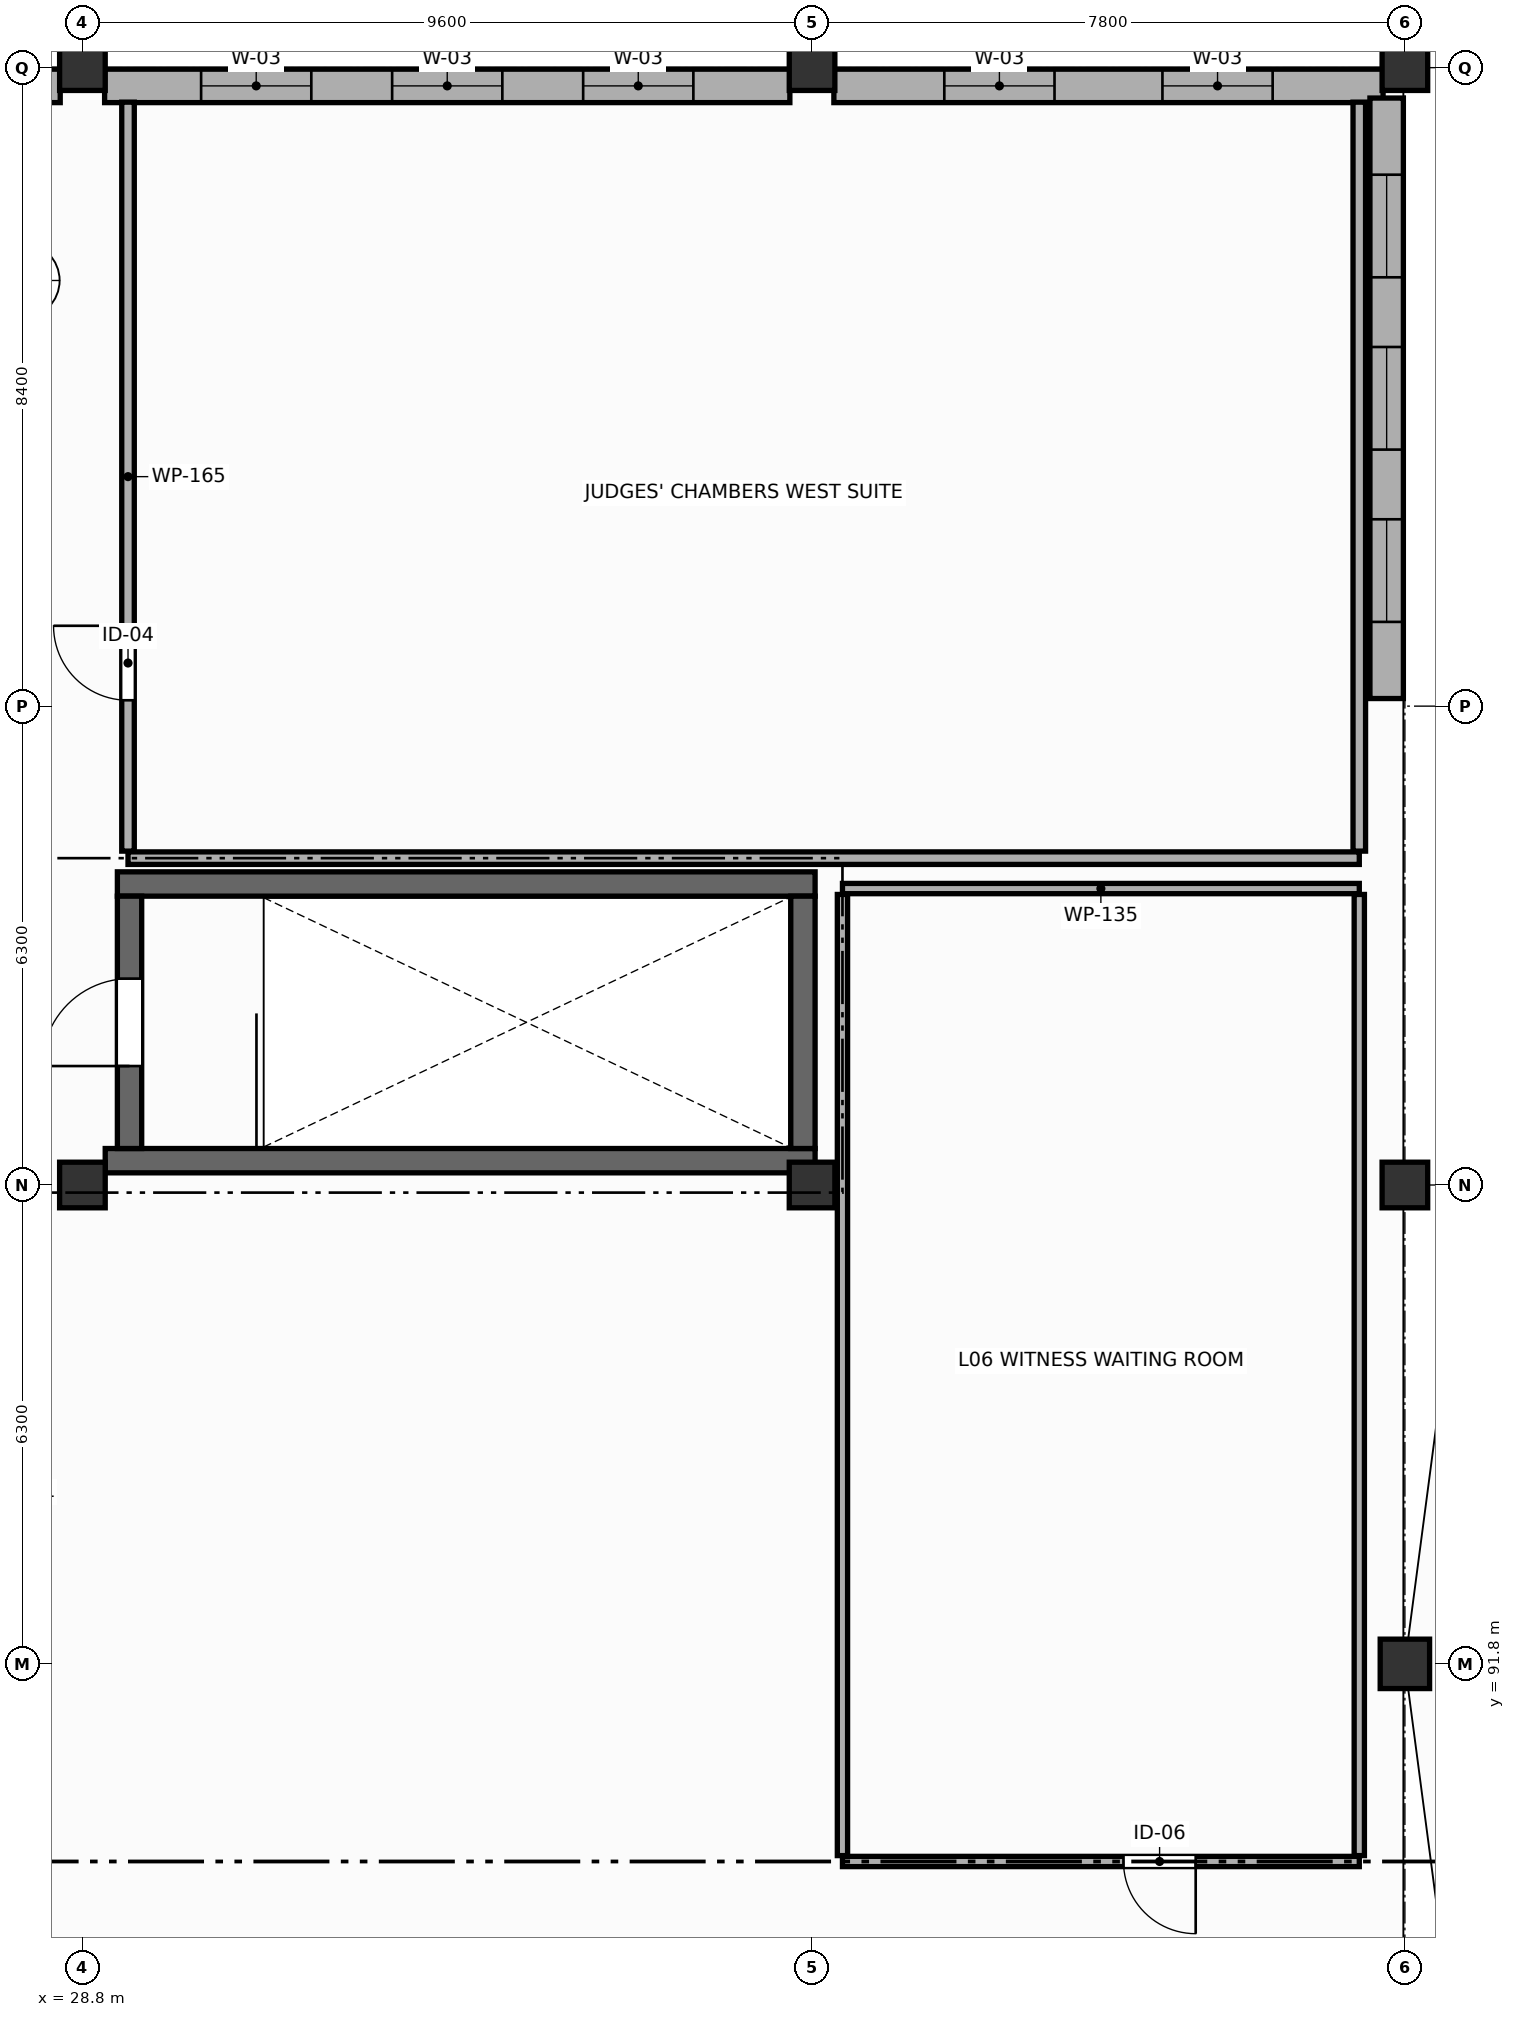
"""IFC4 building model, lengths in metres.
Left out: names, types, materials, properties, quantities, classifications, styles, units other than length and angle.
Written with IfcOpenShell. Run it as: python <this file> out.ifc"""

import sys

from ifc_helpers import new_model, si_unit, direction, frame, frame_2d, origin, origin_2d, place, context, subcontext, project, spatial, rectangle, circle, extrude, element, fill, save


model = new_model("IFC4")
c1 = context("Model", 3, precision=1e-05, world=origin(), true_north=direction((0.0, 1.0)))
c2 = subcontext(c1, "Body", "Model", "MODEL_VIEW")
j1 = project(units=[si_unit("LENGTHUNIT", "METRE"), si_unit("PLANEANGLEUNIT", "RADIAN")], contexts=[c1])
p1 = place(None, origin())
s1 = spatial("IfcSite", under=j1, at=p1, CompositionType="ELEMENT")
p2 = place(p1, origin())
s2 = spatial("IfcBuilding", under=s1, at=p2, CompositionType="ELEMENT")
p3 = place(p2, frame((0.0, 0.0, 22.8)))
s3 = spatial("IfcBuildingStorey", under=s2, at=p3, CompositionType="ELEMENT", Elevation=22.8)
p4 = place(p3, frame((46.2, 91.8, 0.0), z_axis=(0.0, 0.0, 1.0), x_axis=(1.0, 0.0, 0.0)))
e1 = element("IfcColumn", 1, at=p4, inside=s3, PredefinedType="COLUMN", context=c2, shape_type="SweptSolid", body=[
    extrude(circle(Radius=0.325, at=origin_2d()), origin(), (0.0, 0.0, 1.0), 4.2),
])
for number, where, z_axis, x_axis in (
    (2, (28.8, 98.1, 0.0), (0.0, 0.0, 1.0), (1.0, 0.0, 0.0)),
    (3, (28.8, 112.8, 0.0), (0.0, 0.0, 1.0), (1.0, 0.0, 0.0)),
    (4, (38.4, 98.1, 0.0), (0.0, 0.0, 1.0), (1.0, 0.0, 0.0)),
    (5, (38.4, 112.8, 0.0), (0.0, 0.0, 1.0), (1.0, 0.0, 0.0)),
    (6, (46.2, 98.1, 0.0), (0.0, 0.0, 1.0), (1.0, 0.0, 0.0)),
    (7, (46.2, 112.8, 0.0), (0.0, 0.0, 1.0), (1.0, 0.0, 0.0)),
):
    element("IfcColumn", number, at=place(p3, frame(where, z_axis=z_axis, x_axis=x_axis)), inside=s3, PredefinedType="COLUMN", context=c2, shape_type="SweptSolid", body=[
        extrude(rectangle(XDim=0.6, YDim=0.6, at=origin_2d()), origin(), (0.0, 0.0, 1.0), 4.2),
    ])
p5 = place(p3, frame((19.492, 112.56, 0.0), z_axis=(0.0, 0.0, 1.0), x_axis=(1.0, 0.0, 0.0)))
e8 = element("IfcWall", 8, at=p5, inside=s3, PredefinedType="STANDARD", context=c2, shape_type="SweptSolid", body=[
    extrude(rectangle(XDim=9.016, YDim=0.44, at=frame_2d((4.508, 0.0))), origin(), (0.0, 0.0, 1.0), 3.05),
])
p6 = place(p5, frame((1.27, 0.0, 0.78)))
e9 = element("IfcOpeningElement", 9, at=p6, cuts=e8, PredefinedType="OPENING", context=c2, shape_type="SweptSolid", body=[
    extrude(rectangle(XDim=1.45, YDim=2.05, at=frame_2d((0.725, 1.025))), frame((0.0, 0.23, 0.0), z_axis=(0.0, -1.0, 0.0), x_axis=(1.0, 0.0, 0.0)), (0.0, 0.0, 1.0), 0.46),
])
p7 = place(p5, frame((3.783, 0.0, 0.78)))
e10 = element("IfcOpeningElement", 10, at=p7, cuts=e8, PredefinedType="OPENING", context=c2, shape_type="SweptSolid", body=[
    extrude(rectangle(XDim=1.45, YDim=2.05, at=frame_2d((0.725, 1.025))), frame((0.0, 0.23, 0.0), z_axis=(0.0, -1.0, 0.0), x_axis=(1.0, 0.0, 0.0)), (0.0, 0.0, 1.0), 0.46),
])
p8 = place(p5, frame((6.296, 0.0, 0.78)))
e11 = element("IfcOpeningElement", 11, at=p8, cuts=e8, PredefinedType="OPENING", context=c2, shape_type="SweptSolid", body=[
    extrude(rectangle(XDim=1.45, YDim=2.05, at=frame_2d((0.725, 1.025))), frame((0.0, 0.23, 0.0), z_axis=(0.0, -1.0, 0.0), x_axis=(1.0, 0.0, 0.0)), (0.0, 0.0, 1.0), 0.46),
])
p9 = place(p3, frame((29.092, 112.56, 0.0), z_axis=(0.0, 0.0, 1.0), x_axis=(1.0, 0.0, 0.0)))
e12 = element("IfcWall", 12, at=p9, inside=s3, PredefinedType="STANDARD", context=c2, shape_type="SweptSolid", body=[
    extrude(rectangle(XDim=9.016, YDim=0.44, at=frame_2d((4.508, 0.0))), origin(), (0.0, 0.0, 1.0), 3.05),
])
p10 = place(p9, frame((1.27, 0.0, 0.78)))
e13 = element("IfcOpeningElement", 13, at=p10, cuts=e12, PredefinedType="OPENING", context=c2, shape_type="SweptSolid", body=[
    extrude(rectangle(XDim=1.45, YDim=2.05, at=frame_2d((0.725, 1.025))), frame((0.0, 0.23, 0.0), z_axis=(0.0, -1.0, 0.0), x_axis=(1.0, 0.0, 0.0)), (0.0, 0.0, 1.0), 0.46),
])
p11 = place(p9, frame((3.783, 0.0, 0.78)))
e14 = element("IfcOpeningElement", 14, at=p11, cuts=e12, PredefinedType="OPENING", context=c2, shape_type="SweptSolid", body=[
    extrude(rectangle(XDim=1.45, YDim=2.05, at=frame_2d((0.725, 1.025))), frame((0.0, 0.23, 0.0), z_axis=(0.0, -1.0, 0.0), x_axis=(1.0, 0.0, 0.0)), (0.0, 0.0, 1.0), 0.46),
])
p12 = place(p9, frame((6.296, 0.0, 0.78)))
e15 = element("IfcOpeningElement", 15, at=p12, cuts=e12, PredefinedType="OPENING", context=c2, shape_type="SweptSolid", body=[
    extrude(rectangle(XDim=1.45, YDim=2.05, at=frame_2d((0.725, 1.025))), frame((0.0, 0.23, 0.0), z_axis=(0.0, -1.0, 0.0), x_axis=(1.0, 0.0, 0.0)), (0.0, 0.0, 1.0), 0.46),
])
p13 = place(p3, frame((38.687, 112.56, 0.0), z_axis=(0.0, 0.0, 1.0), x_axis=(1.0, 0.0, 0.0)))
e16 = element("IfcWall", 16, at=p13, inside=s3, PredefinedType="STANDARD", context=c2, shape_type="SweptSolid", body=[
    extrude(rectangle(XDim=7.226, YDim=0.44, at=frame_2d((3.613, 0.0))), origin(), (0.0, 0.0, 1.0), 3.05),
])
p14 = place(p13, frame((1.453, 0.0, 0.78)))
e17 = element("IfcOpeningElement", 17, at=p14, cuts=e16, PredefinedType="OPENING", context=c2, shape_type="SweptSolid", body=[
    extrude(rectangle(XDim=1.45, YDim=2.05, at=frame_2d((0.725, 1.025))), frame((0.0, 0.23, 0.0), z_axis=(0.0, -1.0, 0.0), x_axis=(1.0, 0.0, 0.0)), (0.0, 0.0, 1.0), 0.46),
])
p15 = place(p13, frame((4.323, 0.0, 0.78)))
e18 = element("IfcOpeningElement", 18, at=p15, cuts=e16, PredefinedType="OPENING", context=c2, shape_type="SweptSolid", body=[
    extrude(rectangle(XDim=1.45, YDim=2.05, at=frame_2d((0.725, 1.025))), frame((0.0, 0.23, 0.0), z_axis=(0.0, -1.0, 0.0), x_axis=(1.0, 0.0, 0.0)), (0.0, 0.0, 1.0), 0.46),
])
p16 = place(p3, frame((45.96, 104.5, 0.0), z_axis=(0.0, 0.0, 1.0), x_axis=(0.0, 1.0, 0.0)))
e19 = element("IfcWall", 19, at=p16, inside=s3, PredefinedType="STANDARD", context=c2, shape_type="SweptSolid", body=[
    extrude(rectangle(XDim=7.9, YDim=0.44, at=frame_2d((3.95, 0.0))), origin(), (0.0, 0.0, 1.0), 3.05),
])
p17 = place(p16, frame((1.008, 0.0, 0.85)))
e20 = element("IfcOpeningElement", 20, at=p17, cuts=e19, PredefinedType="OPENING", context=c2, shape_type="SweptSolid", body=[
    extrude(rectangle(XDim=1.35, YDim=1.95, at=frame_2d((0.675, 0.975))), frame((0.0, 0.23, 0.0), z_axis=(0.0, -1.0, 0.0), x_axis=(1.0, 0.0, 0.0)), (0.0, 0.0, 1.0), 0.46),
])
p18 = place(p16, frame((3.275, 0.0, 0.85)))
e21 = element("IfcOpeningElement", 21, at=p18, cuts=e19, PredefinedType="OPENING", context=c2, shape_type="SweptSolid", body=[
    extrude(rectangle(XDim=1.35, YDim=1.95, at=frame_2d((0.675, 0.975))), frame((0.0, 0.23, 0.0), z_axis=(0.0, -1.0, 0.0), x_axis=(1.0, 0.0, 0.0)), (0.0, 0.0, 1.0), 0.46),
])
p19 = place(p16, frame((5.542, 0.0, 0.85)))
e22 = element("IfcOpeningElement", 22, at=p19, cuts=e19, PredefinedType="OPENING", context=c2, shape_type="SweptSolid", body=[
    extrude(rectangle(XDim=1.35, YDim=1.95, at=frame_2d((0.675, 0.975))), frame((0.0, 0.23, 0.0), z_axis=(0.0, -1.0, 0.0), x_axis=(1.0, 0.0, 0.0)), (0.0, 0.0, 1.0), 0.46),
])
p20 = place(p3, frame((29.26, 102.06, 0.0), z_axis=(0.0, 0.0, 1.0), x_axis=(1.0, 0.0, 0.0)))
e23 = element("IfcWall", 23, at=p20, inside=s3, PredefinedType="SHEAR", context=c2, shape_type="SweptSolid", body=[
    extrude(rectangle(XDim=9.18, YDim=0.32, at=frame_2d((4.59, 0.0))), origin(), (0.0, 0.0, 1.0), 3.97),
])
p21 = place(p3, frame((38.44, 98.42, 0.0), z_axis=(0.0, 0.0, 1.0), x_axis=(-1.0, 0.0, 0.0)))
e24 = element("IfcWall", 24, at=p21, inside=s3, PredefinedType="SHEAR", context=c2, shape_type="SweptSolid", body=[
    extrude(rectangle(XDim=9.34, YDim=0.32, at=frame_2d((4.67, 0.0))), origin(), (0.0, 0.0, 1.0), 3.97),
])
p22 = place(p3, frame((29.42, 98.58, 0.0), z_axis=(0.0, 0.0, 1.0), x_axis=(0.0, 1.0, 0.0)))
e25 = element("IfcWall", 25, at=p22, inside=s3, PredefinedType="SHEAR", context=c2, shape_type="SweptSolid", body=[
    extrude(rectangle(XDim=3.32, YDim=0.32, at=frame_2d((1.66, 0.0))), origin(), (0.0, 0.0, 1.0), 3.97),
])
p23 = place(p22, frame((1.085, 0.0, 0.0)))
e26 = element("IfcOpeningElement", 26, at=p23, cuts=e25, PredefinedType="OPENING", context=c2, shape_type="SweptSolid", body=[
    extrude(rectangle(XDim=1.15, YDim=2.2, at=frame_2d((0.575, 1.1))), frame((0.0, 0.17, 0.0), z_axis=(0.0, -1.0, 0.0), x_axis=(1.0, 0.0, 0.0)), (0.0, 0.0, 1.0), 0.34),
])
p24 = place(p3, frame((38.28, 101.9, 0.0), z_axis=(0.0, 0.0, 1.0), x_axis=(0.0, -1.0, 0.0)))
e27 = element("IfcWall", 27, at=p24, inside=s3, PredefinedType="SHEAR", context=c2, shape_type="SweptSolid", body=[
    extrude(rectangle(XDim=3.32, YDim=0.32, at=frame_2d((1.66, 0.0))), origin(), (0.0, 0.0, 1.0), 3.97),
])
p25 = place(p3, frame((45.6, 102.4, 0.0), z_axis=(0.0, 0.0, 1.0), x_axis=(-1.0, 0.0, 0.0)))
e28 = element("IfcWall", 28, at=p25, inside=s3, PredefinedType="PARTITIONING", context=c2, shape_type="SweptSolid", body=[
    extrude(rectangle(XDim=16.2, YDim=0.165, at=frame_2d((8.1, 0.0))), origin(), (0.0, 0.0, 1.0), 3.05),
])
p26 = place(p3, frame((29.4, 102.492, 0.0), z_axis=(0.0, 0.0, 1.0), x_axis=(0.0, 1.0, 0.0)))
e29 = element("IfcWall", 29, at=p26, inside=s3, PredefinedType="PARTITIONING", context=c2, shape_type="SweptSolid", body=[
    extrude(rectangle(XDim=9.854, YDim=0.165, at=frame_2d((4.927, 0.0))), origin(), (0.0, 0.0, 1.0), 3.35),
])
p27 = place(p26, frame((1.985, 0.0, 0.0)))
e30 = element("IfcOpeningElement", 30, at=p27, cuts=e29, PredefinedType="OPENING", context=c2, shape_type="SweptSolid", body=[
    extrude(rectangle(XDim=0.98, YDim=2.2, at=frame_2d((0.49, 1.1))), frame((0.0, 0.093, 0.0), z_axis=(0.0, -1.0, 0.0), x_axis=(1.0, 0.0, 0.0)), (0.0, 0.0, 1.0), 0.185),
])
p28 = place(p3, frame((45.6, 112.346, 0.0), z_axis=(0.0, 0.0, 1.0), x_axis=(0.0, -1.0, 0.0)))
e31 = element("IfcWall", 31, at=p28, inside=s3, PredefinedType="PARTITIONING", context=c2, shape_type="SweptSolid", body=[
    extrude(rectangle(XDim=9.854, YDim=0.165, at=frame_2d((4.927, 0.0))), origin(), (0.0, 0.0, 1.0), 3.35),
])
p29 = place(p3, frame((38.8, 102.0, 0.0), z_axis=(0.0, 0.0, 1.0), x_axis=(1.0, 0.0, 0.0)))
e32 = element("IfcWall", 32, at=p29, inside=s3, PredefinedType="PARTITIONING", context=c2, shape_type="SweptSolid", body=[
    extrude(rectangle(XDim=6.8, YDim=0.135, at=frame_2d((3.4, 0.0))), origin(), (0.0, 0.0, 1.0), 3.05),
])
p30 = place(p3, frame((45.6, 89.2, 0.0), z_axis=(0.0, 0.0, 1.0), x_axis=(-1.0, 0.0, 0.0)))
e33 = element("IfcWall", 33, at=p30, inside=s3, PredefinedType="PARTITIONING", context=c2, shape_type="SweptSolid", body=[
    extrude(rectangle(XDim=6.8, YDim=0.135, at=frame_2d((3.4, 0.0))), origin(), (0.0, 0.0, 1.0), 3.075),
])
p31 = place(p30, frame((2.153, 0.0, 0.0)))
e34 = element("IfcOpeningElement", 34, at=p31, cuts=e33, PredefinedType="OPENING", context=c2, shape_type="SweptSolid", body=[
    extrude(rectangle(XDim=0.95, YDim=2.15, at=frame_2d((0.475, 1.075))), frame((0.0, 0.077, 0.0), z_axis=(0.0, -1.0, 0.0), x_axis=(1.0, 0.0, 0.0)), (0.0, 0.0, 1.0), 0.155),
])
p32 = place(p3, frame((38.8, 89.278, 0.0), z_axis=(0.0, 0.0, 1.0), x_axis=(0.0, 1.0, 0.0)))
e35 = element("IfcWall", 35, at=p32, inside=s3, PredefinedType="PARTITIONING", context=c2, shape_type="SweptSolid", body=[
    extrude(rectangle(XDim=12.645, YDim=0.135, at=frame_2d((6.323, 0.0))), origin(), (0.0, 0.0, 1.0), 3.05),
])
p33 = place(p3, frame((45.6, 101.923, 0.0), z_axis=(0.0, 0.0, 1.0), x_axis=(0.0, -1.0, 0.0)))
e36 = element("IfcWall", 36, at=p33, inside=s3, PredefinedType="PARTITIONING", context=c2, shape_type="SweptSolid", body=[
    extrude(rectangle(XDim=12.645, YDim=0.135, at=frame_2d((6.323, 0.0))), origin(), (0.0, 0.0, 1.0), 3.325),
])
p34 = place(p10, origin())
e37 = element("IfcWindow", 37, at=p34, inside=s3, PartitioningType="SINGLE_PANEL", PredefinedType="WINDOW", context=c2, shape_type="SweptSolid", body=[
    extrude(rectangle(XDim=1.45, YDim=2.05, at=frame_2d((0.725, 1.025))), frame((0.0, 0.03, 0.0), z_axis=(0.0, -1.0, 0.0), x_axis=(1.0, 0.0, 0.0)), (0.0, 0.0, 1.0), 0.06),
])
fill(e13, e37)
p35 = place(p11, origin())
e38 = element("IfcWindow", 38, at=p35, inside=s3, PartitioningType="SINGLE_PANEL", PredefinedType="WINDOW", context=c2, shape_type="SweptSolid", body=[
    extrude(rectangle(XDim=1.45, YDim=2.05, at=frame_2d((0.725, 1.025))), frame((0.0, 0.03, 0.0), z_axis=(0.0, -1.0, 0.0), x_axis=(1.0, 0.0, 0.0)), (0.0, 0.0, 1.0), 0.06),
])
fill(e14, e38)
p36 = place(p12, origin())
e39 = element("IfcWindow", 39, at=p36, inside=s3, PartitioningType="SINGLE_PANEL", PredefinedType="WINDOW", context=c2, shape_type="SweptSolid", body=[
    extrude(rectangle(XDim=1.45, YDim=2.05, at=frame_2d((0.725, 1.025))), frame((0.0, 0.03, 0.0), z_axis=(0.0, -1.0, 0.0), x_axis=(1.0, 0.0, 0.0)), (0.0, 0.0, 1.0), 0.06),
])
fill(e15, e39)
p37 = place(p14, origin())
e40 = element("IfcWindow", 40, at=p37, inside=s3, PartitioningType="SINGLE_PANEL", PredefinedType="WINDOW", context=c2, shape_type="SweptSolid", body=[
    extrude(rectangle(XDim=1.45, YDim=2.05, at=frame_2d((0.725, 1.025))), frame((0.0, 0.03, 0.0), z_axis=(0.0, -1.0, 0.0), x_axis=(1.0, 0.0, 0.0)), (0.0, 0.0, 1.0), 0.06),
])
fill(e17, e40)
p38 = place(p15, origin())
e41 = element("IfcWindow", 41, at=p38, inside=s3, PartitioningType="SINGLE_PANEL", PredefinedType="WINDOW", context=c2, shape_type="SweptSolid", body=[
    extrude(rectangle(XDim=1.45, YDim=2.05, at=frame_2d((0.725, 1.025))), frame((0.0, 0.03, 0.0), z_axis=(0.0, -1.0, 0.0), x_axis=(1.0, 0.0, 0.0)), (0.0, 0.0, 1.0), 0.06),
])
fill(e18, e41)
p39 = place(p17, origin())
e42 = element("IfcWindow", 42, at=p39, inside=s3, PartitioningType="SINGLE_PANEL", PredefinedType="WINDOW", context=c2, shape_type="SweptSolid", body=[
    extrude(rectangle(XDim=1.35, YDim=1.95, at=frame_2d((0.675, 0.975))), frame((0.0, 0.03, 0.0), z_axis=(0.0, -1.0, 0.0), x_axis=(1.0, 0.0, 0.0)), (0.0, 0.0, 1.0), 0.06),
])
fill(e20, e42)
p40 = place(p18, origin())
e43 = element("IfcWindow", 43, at=p40, inside=s3, PartitioningType="SINGLE_PANEL", PredefinedType="WINDOW", context=c2, shape_type="SweptSolid", body=[
    extrude(rectangle(XDim=1.35, YDim=1.95, at=frame_2d((0.675, 0.975))), frame((0.0, 0.03, 0.0), z_axis=(0.0, -1.0, 0.0), x_axis=(1.0, 0.0, 0.0)), (0.0, 0.0, 1.0), 0.06),
])
fill(e21, e43)
p41 = place(p19, origin())
e44 = element("IfcWindow", 44, at=p41, inside=s3, PartitioningType="SINGLE_PANEL", PredefinedType="WINDOW", context=c2, shape_type="SweptSolid", body=[
    extrude(rectangle(XDim=1.35, YDim=1.95, at=frame_2d((0.675, 0.975))), frame((0.0, 0.03, 0.0), z_axis=(0.0, -1.0, 0.0), x_axis=(1.0, 0.0, 0.0)), (0.0, 0.0, 1.0), 0.06),
])
fill(e22, e44)
p42 = place(p23, origin())
e45 = element("IfcDoor", 45, at=p42, inside=s3, OperationType="SINGLE_SWING_LEFT", PredefinedType="DOOR", context=c2, shape_type="SweptSolid", body=[
    extrude(rectangle(XDim=1.15, YDim=2.2, at=frame_2d((0.575, 1.1))), frame((0.0, 0.025, 0.0), z_axis=(0.0, -1.0, 0.0), x_axis=(1.0, 0.0, 0.0)), (0.0, 0.0, 1.0), 0.05),
])
fill(e26, e45)
p43 = place(p27, origin())
e46 = element("IfcDoor", 46, at=p43, inside=s3, OperationType="SINGLE_SWING_RIGHT", PredefinedType="DOOR", context=c2, shape_type="SweptSolid", body=[
    extrude(rectangle(XDim=0.98, YDim=2.2, at=frame_2d((0.49, 1.1))), frame((0.0, 0.025, 0.0), z_axis=(0.0, -1.0, 0.0), x_axis=(1.0, 0.0, 0.0)), (0.0, 0.0, 1.0), 0.05),
])
fill(e30, e46)
p44 = place(p31, origin())
e47 = element("IfcDoor", 47, at=p44, inside=s3, OperationType="SINGLE_SWING_LEFT", PredefinedType="DOOR", context=c2, shape_type="SweptSolid", body=[
    extrude(rectangle(XDim=0.95, YDim=2.15, at=frame_2d((0.475, 1.075))), frame((0.0, 0.025, 0.0), z_axis=(0.0, -1.0, 0.0), x_axis=(1.0, 0.0, 0.0)), (0.0, 0.0, 1.0), 0.05),
])
fill(e34, e47)
save(model, sys.argv[1])
